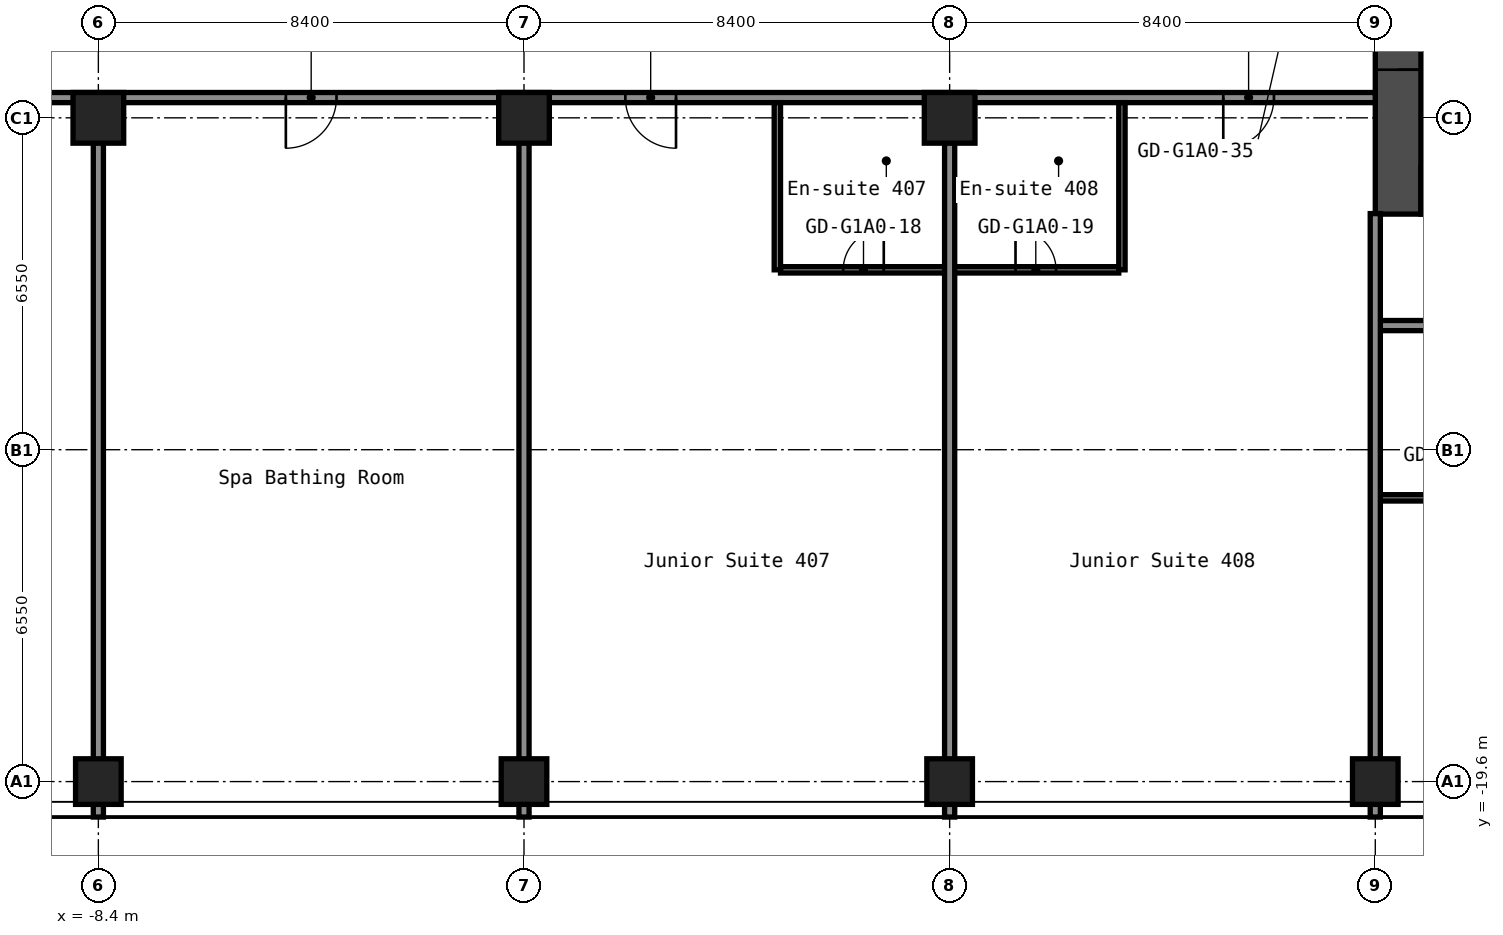
"""IFC4 building model, lengths in metres.
Left out: names, types, materials, properties, quantities, classifications, styles, units other than length and angle.
Written with IfcOpenShell. Run it as: python <this file> out.ifc"""

import sys

from ifc_helpers import new_model, si_unit, direction, frame, frame_2d, origin, origin_2d, place, context, subcontext, project, spatial, rectangle, hollow_rectangle, extrude, element, fill, save


model = new_model("IFC4")
c1 = context("Model", 3, precision=1e-05, world=origin(), true_north=direction((0.0, 1.0)))
c2 = subcontext(c1, "Body", "Model", "MODEL_VIEW")
j1 = project(units=[si_unit("LENGTHUNIT", "METRE"), si_unit("PLANEANGLEUNIT", "RADIAN")], contexts=[c1])
p1 = place(None, origin())
s1 = spatial("IfcSite", under=j1, at=p1, CompositionType="ELEMENT")
p2 = place(p1, origin())
s2 = spatial("IfcBuilding", under=s1, at=p2, CompositionType="ELEMENT")
p3 = place(p2, frame((0.0, 0.0, 19.8)))
s3 = spatial("IfcBuildingStorey", under=s2, at=p3, CompositionType="ELEMENT", Elevation=19.8)
p4 = place(p3, frame((-8.4, -19.6, 0.0), z_axis=(0.0, 0.0, 1.0), x_axis=(1.0, 0.0, 0.0)))
e1 = element("IfcColumn", 1, at=p4, inside=s3, PredefinedType="COLUMN", context=c2, shape_type="SweptSolid", body=[
    extrude(hollow_rectangle(XDim=0.9, YDim=0.9, WallThickness=0.036, at=origin_2d()), origin(), (0.0, 0.0, 1.0), 2.8),
])
p5 = place(p3, frame((-8.4, -6.5, 0.0), z_axis=(0.0, 0.0, 1.0), x_axis=(1.0, 0.0, 0.0)))
e2 = element("IfcColumn", 2, at=p5, inside=s3, PredefinedType="COLUMN", context=c2, shape_type="SweptSolid", body=[
    extrude(hollow_rectangle(XDim=1.0, YDim=1.0, WallThickness=0.04, at=origin_2d()), origin(), (0.0, 0.0, 1.0), 2.8),
])
p6 = place(p3, frame((0.0, -19.6, 0.0), z_axis=(0.0, 0.0, 1.0), x_axis=(1.0, 0.0, 0.0)))
e3 = element("IfcColumn", 3, at=p6, inside=s3, PredefinedType="COLUMN", context=c2, shape_type="SweptSolid", body=[
    extrude(hollow_rectangle(XDim=0.9, YDim=0.9, WallThickness=0.036, at=origin_2d()), origin(), (0.0, 0.0, 1.0), 2.8),
])
p7 = place(p3, frame((0.0, -6.5, 0.0), z_axis=(0.0, 0.0, 1.0), x_axis=(1.0, 0.0, 0.0)))
e4 = element("IfcColumn", 4, at=p7, inside=s3, PredefinedType="COLUMN", context=c2, shape_type="SweptSolid", body=[
    extrude(hollow_rectangle(XDim=1.0, YDim=1.0, WallThickness=0.04, at=origin_2d()), origin(), (0.0, 0.0, 1.0), 2.8),
])
p8 = place(p3, frame((8.4, -19.6, 0.0), z_axis=(0.0, 0.0, 1.0), x_axis=(1.0, 0.0, 0.0)))
e5 = element("IfcColumn", 5, at=p8, inside=s3, PredefinedType="COLUMN", context=c2, shape_type="SweptSolid", body=[
    extrude(hollow_rectangle(XDim=0.9, YDim=0.9, WallThickness=0.036, at=origin_2d()), origin(), (0.0, 0.0, 1.0), 2.8),
])
p9 = place(p3, frame((8.4, -6.5, 0.0), z_axis=(0.0, 0.0, 1.0), x_axis=(1.0, 0.0, 0.0)))
e6 = element("IfcColumn", 6, at=p9, inside=s3, PredefinedType="COLUMN", context=c2, shape_type="SweptSolid", body=[
    extrude(hollow_rectangle(XDim=1.0, YDim=1.0, WallThickness=0.04, at=origin_2d()), origin(), (0.0, 0.0, 1.0), 2.8),
])
p10 = place(p3, frame((16.8, -19.6, 0.0), z_axis=(0.0, 0.0, 1.0), x_axis=(1.0, 0.0, 0.0)))
e7 = element("IfcColumn", 7, at=p10, inside=s3, PredefinedType="COLUMN", context=c2, shape_type="SweptSolid", body=[
    extrude(hollow_rectangle(XDim=0.9, YDim=0.9, WallThickness=0.036, at=origin_2d()), origin(), (0.0, 0.0, 1.0), 2.8),
])
p11 = place(p3, frame((17.25, -8.4, 0.0), z_axis=(0.0, 0.0, 1.0), x_axis=(0.0, 1.0, 0.0)))
e8 = element("IfcWall", 8, at=p11, inside=s3, PredefinedType="SHEAR", context=c2, shape_type="SweptSolid", body=[
    extrude(rectangle(XDim=16.8, YDim=0.9, at=frame_2d((8.4, 0.0))), origin(), (0.0, 0.0, 1.0), 2.8),
])
p12 = place(p11, frame((12.75, 0.0, 0.0)))
e9 = element("IfcOpeningElement", 9, at=p12, cuts=e8, PredefinedType="OPENING", context=c2, shape_type="SweptSolid", body=[
    extrude(rectangle(XDim=1.2, YDim=2.1, at=frame_2d((0.6, 1.05))), frame((0.0, 0.46, 0.0), z_axis=(0.0, -1.0, 0.0), x_axis=(1.0, 0.0, 0.0)), (0.0, 0.0, 1.0), 0.92),
])
p13 = place(p11, frame((2.85, 0.0, 0.0)))
e10 = element("IfcOpeningElement", 10, at=p13, cuts=e8, PredefinedType="OPENING", context=c2, shape_type="SweptSolid", body=[
    extrude(rectangle(XDim=1.2, YDim=2.1, at=frame_2d((0.6, 1.05))), frame((0.0, 0.46, 0.0), z_axis=(0.0, -1.0, 0.0), x_axis=(1.0, 0.0, 0.0)), (0.0, 0.0, 1.0), 0.92),
])
p14 = place(p3, frame((17.7, -7.95, 0.0), z_axis=(0.0, 0.0, 1.0), x_axis=(1.0, 0.0, 0.0)))
e11 = element("IfcWall", 11, at=p14, inside=s3, PredefinedType="SHEAR", context=c2, shape_type="SweptSolid", body=[
    extrude(rectangle(XDim=15.0, YDim=0.9, at=frame_2d((7.5, 0.0))), origin(), (0.0, 0.0, 1.0), 2.8),
])
p15 = place(p14, frame((2.55, 0.0, 0.0)))
e12 = element("IfcOpeningElement", 12, at=p15, cuts=e11, PredefinedType="OPENING", context=c2, shape_type="SweptSolid", body=[
    extrude(rectangle(XDim=1.0, YDim=2.1, at=frame_2d((0.5, 1.05))), frame((0.0, 0.46, 0.0), z_axis=(0.0, -1.0, 0.0), x_axis=(1.0, 0.0, 0.0)), (0.0, 0.0, 1.0), 0.92),
])
p16 = place(p3, frame((16.9, -14.0, 0.0), z_axis=(0.0, 0.0, 1.0), x_axis=(1.0, 0.0, 0.0)))
e13 = element("IfcWall", 13, at=p16, inside=s3, PredefinedType="PARTITIONING", context=c2, shape_type="SweptSolid", body=[
    extrude(rectangle(XDim=3.238, YDim=0.125, at=frame_2d((1.619, 0.0))), origin(), (0.0, 0.0, 1.0), 2.8),
])
p17 = place(p16, frame((1.2, 0.0, 0.0)))
e14 = element("IfcOpeningElement", 14, at=p17, cuts=e13, PredefinedType="OPENING", context=c2, shape_type="SweptSolid", body=[
    extrude(rectangle(XDim=0.8, YDim=2.1, at=frame_2d((0.4, 1.05))), frame((0.0, 0.073, 0.0), z_axis=(0.0, -1.0, 0.0), x_axis=(1.0, 0.0, 0.0)), (0.0, 0.0, 1.0), 0.145),
])
p18 = place(p3, frame((16.8, -10.6, 0.0), z_axis=(0.0, 0.0, 1.0), x_axis=(1.0, 0.0, 0.0)))
e15 = element("IfcWall", 15, at=p18, inside=s3, PredefinedType="PARTITIONING", context=c2, shape_type="SweptSolid", body=[
    extrude(rectangle(XDim=34.3, YDim=0.2, at=frame_2d((17.15, 0.0))), origin(), (0.0, 0.0, 1.0), 2.8),
])
p19 = place(p18, frame((5.4, 0.0, 0.0)))
e16 = element("IfcOpeningElement", 16, at=p19, cuts=e15, PredefinedType="OPENING", context=c2, shape_type="SweptSolid", body=[
    extrude(rectangle(XDim=1.0, YDim=2.1, at=frame_2d((0.5, 1.05))), frame((0.0, 0.11, 0.0), z_axis=(0.0, -1.0, 0.0), x_axis=(1.0, 0.0, 0.0)), (0.0, 0.0, 1.0), 0.22),
])
p20 = place(p18, frame((10.4, 0.0, 0.0)))
e17 = element("IfcOpeningElement", 17, at=p20, cuts=e15, PredefinedType="OPENING", context=c2, shape_type="SweptSolid", body=[
    extrude(rectangle(XDim=1.0, YDim=2.1, at=frame_2d((0.5, 1.05))), frame((0.0, 0.11, 0.0), z_axis=(0.0, -1.0, 0.0), x_axis=(1.0, 0.0, 0.0)), (0.0, 0.0, 1.0), 0.22),
])
p21 = place(p18, frame((22.2, 0.0, 0.0)))
e18 = element("IfcOpeningElement", 18, at=p21, cuts=e15, PredefinedType="OPENING", context=c2, shape_type="SweptSolid", body=[
    extrude(rectangle(XDim=1.0, YDim=2.1, at=frame_2d((0.5, 1.05))), frame((0.0, 0.11, 0.0), z_axis=(0.0, -1.0, 0.0), x_axis=(1.0, 0.0, 0.0)), (0.0, 0.0, 1.0), 0.22),
])
p22 = place(p18, frame((30.8, 0.0, 0.0)))
e19 = element("IfcOpeningElement", 19, at=p22, cuts=e15, PredefinedType="OPENING", context=c2, shape_type="SweptSolid", body=[
    extrude(rectangle(XDim=1.0, YDim=2.1, at=frame_2d((0.5, 1.05))), frame((0.0, 0.11, 0.0), z_axis=(0.0, -1.0, 0.0), x_axis=(1.0, 0.0, 0.0)), (0.0, 0.0, 1.0), 0.22),
])
p23 = place(p3, frame((5.062, -9.5, 0.0), z_axis=(0.0, 0.0, 1.0), x_axis=(1.0, 0.0, 0.0)))
e20 = element("IfcWall", 20, at=p23, inside=s3, PredefinedType="PARTITIONING", context=c2, shape_type="SweptSolid", body=[
    extrude(rectangle(XDim=6.675, YDim=0.125, at=frame_2d((3.337, 0.0))), origin(), (0.0, 0.0, 1.0), 2.8),
])
p24 = place(p23, frame((1.238, 0.0, 0.0)))
e21 = element("IfcOpeningElement", 21, at=p24, cuts=e20, PredefinedType="OPENING", context=c2, shape_type="SweptSolid", body=[
    extrude(rectangle(XDim=0.8, YDim=2.1, at=frame_2d((0.4, 1.05))), frame((0.0, 0.073, 0.0), z_axis=(0.0, -1.0, 0.0), x_axis=(1.0, 0.0, 0.0)), (0.0, 0.0, 1.0), 0.145),
])
p25 = place(p23, frame((4.637, 0.0, 0.0)))
e22 = element("IfcOpeningElement", 22, at=p25, cuts=e20, PredefinedType="OPENING", context=c2, shape_type="SweptSolid", body=[
    extrude(rectangle(XDim=0.8, YDim=2.1, at=frame_2d((0.4, 1.05))), frame((0.0, 0.073, 0.0), z_axis=(0.0, -1.0, 0.0), x_axis=(1.0, 0.0, 0.0)), (0.0, 0.0, 1.0), 0.145),
])
p26 = place(p3, frame((-16.8, -6.1, 0.0), z_axis=(0.0, 0.0, 1.0), x_axis=(1.0, 0.0, 0.0)))
e23 = element("IfcWall", 23, at=p26, inside=s3, PredefinedType="PARTITIONING", context=c2, shape_type="SweptSolid", body=[
    extrude(rectangle(XDim=33.6, YDim=0.2, at=frame_2d((16.8, 0.0))), origin(), (0.0, 0.0, 1.0), 2.8),
])
p27 = place(p26, frame((5.4, 0.0, 0.0)))
e24 = element("IfcOpeningElement", 24, at=p27, cuts=e23, PredefinedType="OPENING", context=c2, shape_type="SweptSolid", body=[
    extrude(rectangle(XDim=1.0, YDim=2.1, at=frame_2d((0.5, 1.05))), frame((0.0, 0.11, 0.0), z_axis=(0.0, -1.0, 0.0), x_axis=(1.0, 0.0, 0.0)), (0.0, 0.0, 1.0), 0.22),
])
p28 = place(p26, frame((12.1, 0.0, 0.0)))
e25 = element("IfcOpeningElement", 25, at=p28, cuts=e23, PredefinedType="OPENING", context=c2, shape_type="SweptSolid", body=[
    extrude(rectangle(XDim=1.0, YDim=2.1, at=frame_2d((0.5, 1.05))), frame((0.0, 0.11, 0.0), z_axis=(0.0, -1.0, 0.0), x_axis=(1.0, 0.0, 0.0)), (0.0, 0.0, 1.0), 0.22),
])
p29 = place(p26, frame((18.8, 0.0, 0.0)))
e26 = element("IfcOpeningElement", 26, at=p29, cuts=e23, PredefinedType="OPENING", context=c2, shape_type="SweptSolid", body=[
    extrude(rectangle(XDim=1.0, YDim=2.1, at=frame_2d((0.5, 1.05))), frame((0.0, 0.11, 0.0), z_axis=(0.0, -1.0, 0.0), x_axis=(1.0, 0.0, 0.0)), (0.0, 0.0, 1.0), 0.22),
])
p30 = place(p26, frame((30.6, 0.0, 0.0)))
e27 = element("IfcOpeningElement", 27, at=p30, cuts=e23, PredefinedType="OPENING", context=c2, shape_type="SweptSolid", body=[
    extrude(rectangle(XDim=1.0, YDim=2.1, at=frame_2d((0.5, 1.05))), frame((0.0, 0.11, 0.0), z_axis=(0.0, -1.0, 0.0), x_axis=(1.0, 0.0, 0.0)), (0.0, 0.0, 1.0), 0.22),
])
for number, where, z_axis, x_axis in (
    (28, (-8.4, -20.3, 0.0), (0.0, 0.0, 1.0), (0.0, 1.0, 0.0)),
    (29, (0.0, -20.3, 0.0), (0.0, 0.0, 1.0), (0.0, 1.0, 0.0)),
):
    element("IfcWall", number, at=place(p3, frame(where, z_axis=z_axis, x_axis=x_axis)), inside=s3, PredefinedType="PARTITIONING", context=c2, shape_type="SweptSolid", body=[
        extrude(rectangle(XDim=13.31, YDim=0.2, at=frame_2d((6.655, 0.0))), origin(), (0.0, 0.0, 1.0), 2.8),
    ])
p31 = place(p3, frame((5.0, -9.5, 0.0), z_axis=(0.0, 0.0, 1.0), x_axis=(0.0, 1.0, 0.0)))
e30 = element("IfcWall", 30, at=p31, inside=s3, PredefinedType="PARTITIONING", context=c2, shape_type="SweptSolid", body=[
    extrude(rectangle(XDim=3.3, YDim=0.125, at=frame_2d((1.65, 0.0))), origin(), (0.0, 0.0, 1.0), 2.8),
])
p32 = place(p3, frame((8.4, -20.3, 0.0), z_axis=(0.0, 0.0, 1.0), x_axis=(0.0, 1.0, 0.0)))
e31 = element("IfcWall", 31, at=p32, inside=s3, PredefinedType="PARTITIONING", context=c2, shape_type="SweptSolid", body=[
    extrude(rectangle(XDim=13.31, YDim=0.2, at=frame_2d((6.655, 0.0))), origin(), (0.0, 0.0, 1.0), 2.8),
])
p33 = place(p3, frame((11.8, -9.5, 0.0), z_axis=(0.0, 0.0, 1.0), x_axis=(0.0, 1.0, 0.0)))
e32 = element("IfcWall", 32, at=p33, inside=s3, PredefinedType="PARTITIONING", context=c2, shape_type="SweptSolid", body=[
    extrude(rectangle(XDim=3.3, YDim=0.125, at=frame_2d((1.65, 0.0))), origin(), (0.0, 0.0, 1.0), 2.8),
])
p34 = place(p3, frame((16.8, -20.3, 0.0), z_axis=(0.0, 0.0, 1.0), x_axis=(0.0, 1.0, 0.0)))
e33 = element("IfcWall", 33, at=p34, inside=s3, PredefinedType="PARTITIONING", context=c2, shape_type="SweptSolid", body=[
    extrude(rectangle(XDim=11.91, YDim=0.2, at=frame_2d((5.955, 0.0))), origin(), (0.0, 0.0, 1.0), 2.8),
])
p35 = place(p13, origin())
e34 = element("IfcDoor", 34, at=p35, inside=s3, OperationType="DOUBLE_DOOR_SINGLE_SWING", PredefinedType="DOOR", context=c2, shape_type="SweptSolid", body=[
    extrude(rectangle(XDim=1.2, YDim=2.1, at=frame_2d((0.6, 1.05))), frame((0.0, 0.025, 0.0), z_axis=(0.0, -1.0, 0.0), x_axis=(1.0, 0.0, 0.0)), (0.0, 0.0, 1.0), 0.05),
])
fill(e10, e34)
p36 = place(p24, origin())
e35 = element("IfcDoor", 35, at=p36, inside=s3, OperationType="SINGLE_SWING_LEFT", PredefinedType="DOOR", context=c2, shape_type="SweptSolid", body=[
    extrude(rectangle(XDim=0.8, YDim=2.1, at=frame_2d((0.4, 1.05))), frame((0.0, 0.025, 0.0), z_axis=(0.0, -1.0, 0.0), x_axis=(1.0, 0.0, 0.0)), (0.0, 0.0, 1.0), 0.05),
])
fill(e21, e35)
p37 = place(p25, origin())
e36 = element("IfcDoor", 36, at=p37, inside=s3, OperationType="SINGLE_SWING_RIGHT", PredefinedType="DOOR", context=c2, shape_type="SweptSolid", body=[
    extrude(rectangle(XDim=0.8, YDim=2.1, at=frame_2d((0.4, 1.05))), frame((0.0, 0.025, 0.0), z_axis=(0.0, -1.0, 0.0), x_axis=(1.0, 0.0, 0.0)), (0.0, 0.0, 1.0), 0.05),
])
fill(e22, e36)
p38 = place(p28, origin())
e37 = element("IfcDoor", 37, at=p38, inside=s3, OperationType="SINGLE_SWING_LEFT", PredefinedType="DOOR", context=c2, shape_type="SweptSolid", body=[
    extrude(rectangle(XDim=1.0, YDim=2.1, at=frame_2d((0.5, 1.05))), frame((0.0, 0.025, 0.0), z_axis=(0.0, -1.0, 0.0), x_axis=(1.0, 0.0, 0.0)), (0.0, 0.0, 1.0), 0.05),
])
fill(e25, e37)
p39 = place(p29, origin())
e38 = element("IfcDoor", 38, at=p39, inside=s3, OperationType="SINGLE_SWING_RIGHT", PredefinedType="DOOR", context=c2, shape_type="SweptSolid", body=[
    extrude(rectangle(XDim=1.0, YDim=2.1, at=frame_2d((0.5, 1.05))), frame((0.0, 0.025, 0.0), z_axis=(0.0, -1.0, 0.0), x_axis=(1.0, 0.0, 0.0)), (0.0, 0.0, 1.0), 0.05),
])
fill(e26, e38)
p40 = place(p30, origin())
e39 = element("IfcDoor", 39, at=p40, inside=s3, OperationType="SINGLE_SWING_LEFT", PredefinedType="DOOR", context=c2, shape_type="SweptSolid", body=[
    extrude(rectangle(XDim=1.0, YDim=2.1, at=frame_2d((0.5, 1.05))), frame((0.0, 0.025, 0.0), z_axis=(0.0, -1.0, 0.0), x_axis=(1.0, 0.0, 0.0)), (0.0, 0.0, 1.0), 0.05),
])
fill(e27, e39)
save(model, sys.argv[1])
